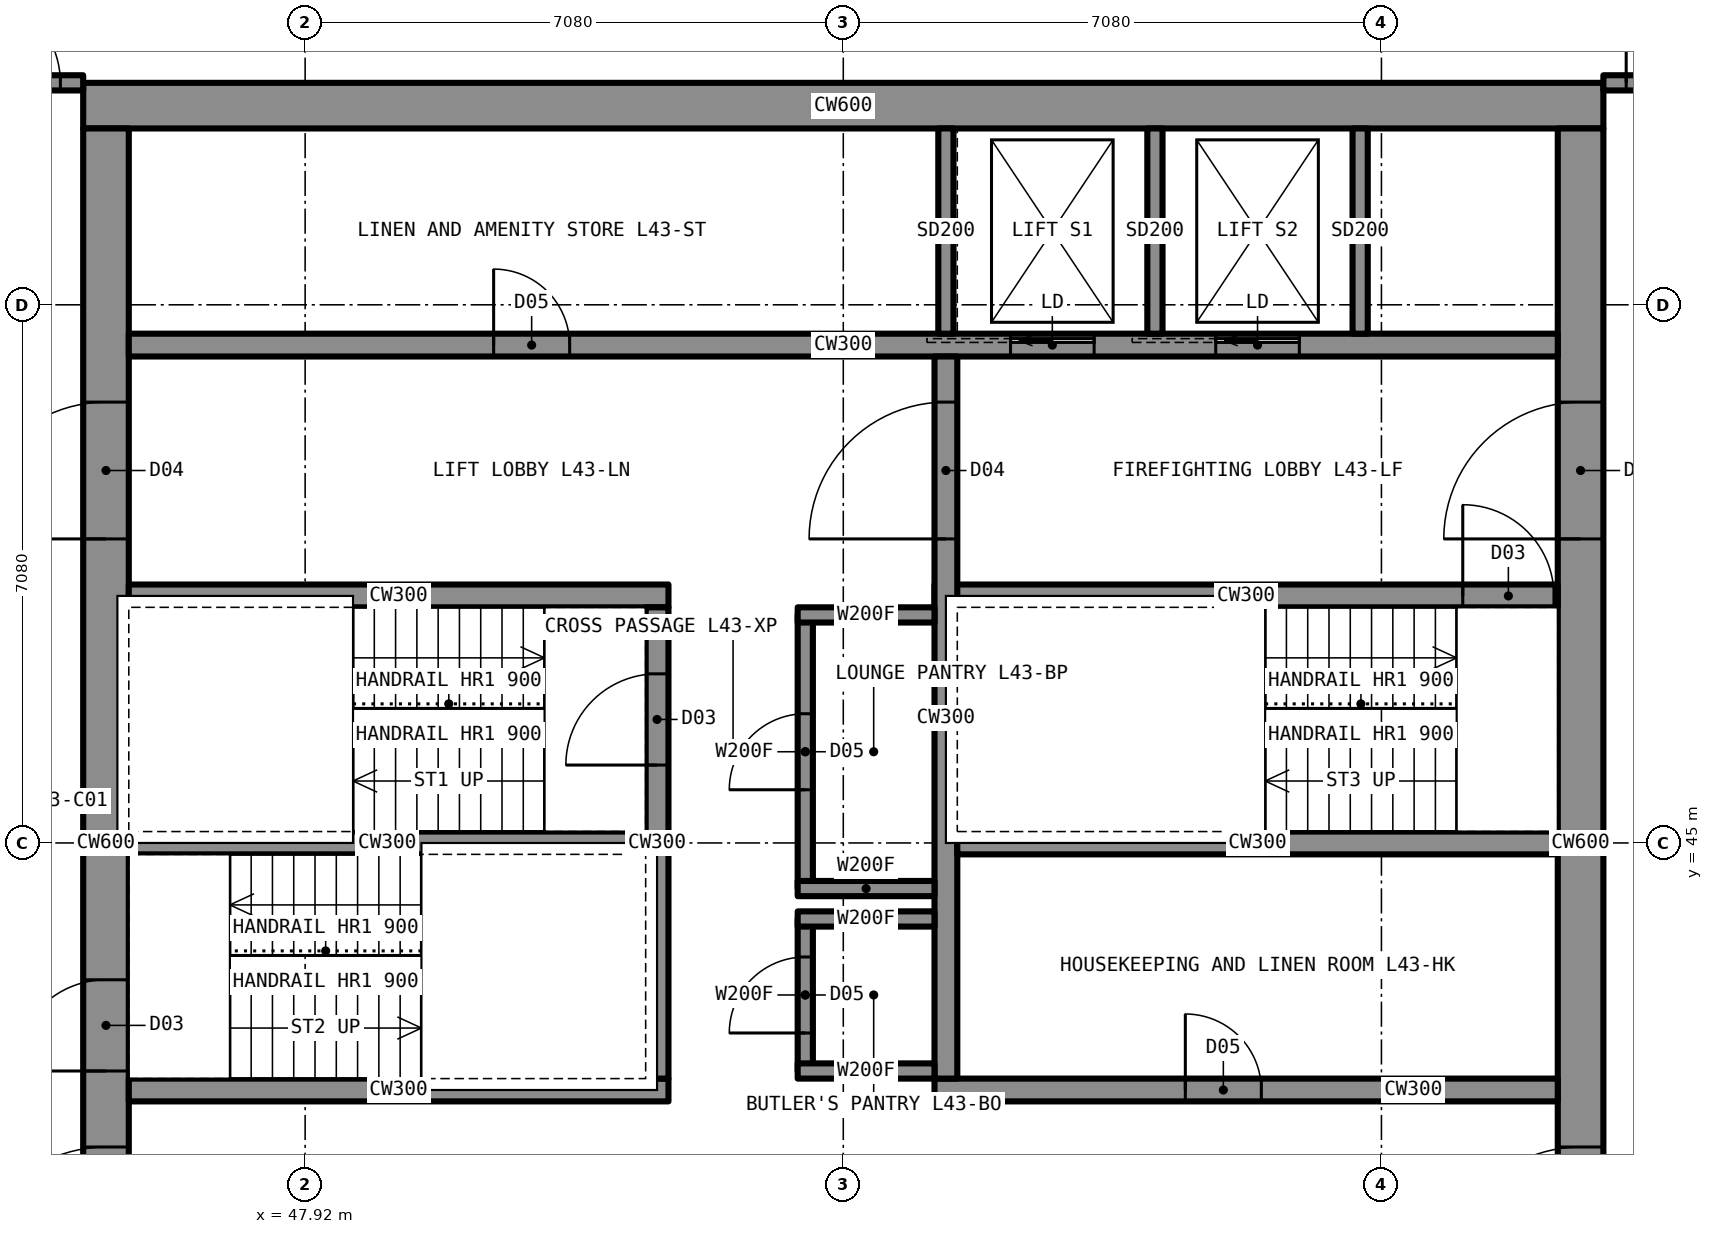
"""IFC4 building model, lengths in metres.
Left out: names, types, materials, properties, quantities, classifications, styles, units other than length and angle.
Written with IfcOpenShell. Run it as: python <this file> out.ifc"""

import sys

from ifc_helpers import new_model, si_unit, direction, frame, frame_2d, origin, place, context, subcontext, project, spatial, rectangle, extrude, element, fill, save


model = new_model("IFC4")
c1 = context("Model", 3, precision=1e-05, world=origin(), true_north=direction((0.0, 1.0)))
c2 = subcontext(c1, "Body", "Model", "MODEL_VIEW")
j1 = project(units=[si_unit("LENGTHUNIT", "METRE"), si_unit("PLANEANGLEUNIT", "RADIAN")], contexts=[c1])
p1 = place(None, origin())
s1 = spatial("IfcSite", under=j1, at=p1, CompositionType="ELEMENT")
p2 = place(p1, origin())
s2 = spatial("IfcBuilding", under=s1, at=p2, CompositionType="ELEMENT")
p3 = place(p2, frame((0.0, 0.0, 161.8)))
s3 = spatial("IfcBuildingStorey", under=s2, at=p3, CompositionType="ELEMENT", Elevation=161.8)
p4 = place(p3, frame((45.0, 54.7, 0.0), z_axis=(0.0, 0.0, 1.0), x_axis=(1.0, 0.0, 0.0)))
e1 = element("IfcWall", 1, at=p4, inside=s3, PredefinedType="SHEAR", context=c2, shape_type="SweptSolid", body=[
    extrude(rectangle(XDim=20.0, YDim=0.6, at=frame_2d((10.0, 0.0))), origin(), (0.0, 0.0, 1.0), 3.5),
])
p5 = place(p3, frame((64.7, 35.6, 0.0), z_axis=(0.0, 0.0, 1.0), x_axis=(0.0, 1.0, 0.0)))
e2 = element("IfcWall", 2, at=p5, inside=s3, PredefinedType="SHEAR", context=c2, shape_type="SweptSolid", body=[
    extrude(rectangle(XDim=18.8, YDim=0.6, at=frame_2d((9.4, 0.0))), origin(), (0.0, 0.0, 1.0), 3.5),
])
p6 = place(p5, frame((13.4, 0.0, 0.0)))
e3 = element("IfcOpeningElement", 3, at=p6, cuts=e2, PredefinedType="OPENING", context=c2, shape_type="SweptSolid", body=[
    extrude(rectangle(XDim=1.8, YDim=2.2, at=frame_2d((0.9, 1.1))), frame((0.0, 0.31, 0.0), z_axis=(0.0, -1.0, 0.0), x_axis=(1.0, 0.0, 0.0)), (0.0, 0.0, 1.0), 0.62),
])
p7 = place(p5, frame((3.6, 0.0, 0.0)))
e4 = element("IfcOpeningElement", 4, at=p7, cuts=e2, PredefinedType="OPENING", context=c2, shape_type="SweptSolid", body=[
    extrude(rectangle(XDim=1.8, YDim=2.2, at=frame_2d((0.9, 1.1))), frame((0.0, 0.31, 0.0), z_axis=(0.0, -1.0, 0.0), x_axis=(1.0, 0.0, 0.0)), (0.0, 0.0, 1.0), 0.62),
])
p8 = place(p3, frame((45.3, 35.6, 0.0), z_axis=(0.0, 0.0, 1.0), x_axis=(0.0, 1.0, 0.0)))
e5 = element("IfcWall", 5, at=p8, inside=s3, PredefinedType="SHEAR", context=c2, shape_type="SweptSolid", body=[
    extrude(rectangle(XDim=18.8, YDim=0.6, at=frame_2d((9.4, 0.0))), origin(), (0.0, 0.0, 1.0), 3.5),
])
p9 = place(p8, frame((13.4, 0.0, 0.0)))
e6 = element("IfcOpeningElement", 6, at=p9, cuts=e5, PredefinedType="OPENING", context=c2, shape_type="SweptSolid", body=[
    extrude(rectangle(XDim=1.8, YDim=2.2, at=frame_2d((0.9, 1.1))), frame((0.0, 0.31, 0.0), z_axis=(0.0, -1.0, 0.0), x_axis=(1.0, 0.0, 0.0)), (0.0, 0.0, 1.0), 0.62),
])
p10 = place(p8, frame((3.6, 0.0, 0.0)))
e7 = element("IfcOpeningElement", 7, at=p10, cuts=e5, PredefinedType="OPENING", context=c2, shape_type="SweptSolid", body=[
    extrude(rectangle(XDim=1.8, YDim=2.2, at=frame_2d((0.9, 1.1))), frame((0.0, 0.31, 0.0), z_axis=(0.0, -1.0, 0.0), x_axis=(1.0, 0.0, 0.0)), (0.0, 0.0, 1.0), 0.62),
])
p11 = place(p8, frame((6.4, 0.0, 0.0)))
e8 = element("IfcOpeningElement", 8, at=p11, cuts=e5, PredefinedType="OPENING", context=c2, shape_type="SweptSolid", body=[
    extrude(rectangle(XDim=1.2, YDim=2.2, at=frame_2d((0.6, 1.1))), frame((0.0, 0.31, 0.0), z_axis=(0.0, -1.0, 0.0), x_axis=(1.0, 0.0, 0.0)), (0.0, 0.0, 1.0), 0.62),
])
p12 = place(p3, frame((45.6, 51.55, 0.0), z_axis=(0.0, 0.0, 1.0), x_axis=(1.0, 0.0, 0.0)))
e9 = element("IfcWall", 9, at=p12, inside=s3, PredefinedType="SHEAR", context=c2, shape_type="SweptSolid", body=[
    extrude(rectangle(XDim=18.8, YDim=0.3, at=frame_2d((9.4, 0.0))), origin(), (0.0, 0.0, 1.0), 3.5),
])
p13 = place(p12, frame((4.8, 0.0, 0.0)))
e10 = element("IfcOpeningElement", 10, at=p13, cuts=e9, PredefinedType="OPENING", context=c2, shape_type="SweptSolid", body=[
    extrude(rectangle(XDim=1.0, YDim=2.1, at=frame_2d((0.5, 1.05))), frame((0.0, 0.16, 0.0), z_axis=(0.0, -1.0, 0.0), x_axis=(1.0, 0.0, 0.0)), (0.0, 0.0, 1.0), 0.32),
])
p14 = place(p12, frame((11.6, 0.0, 0.0)))
e11 = element("IfcOpeningElement", 11, at=p14, cuts=e9, PredefinedType="OPENING", context=c2, shape_type="SweptSolid", body=[
    extrude(rectangle(XDim=1.1, YDim=2.2, at=frame_2d((0.55, 1.1))), frame((0.0, 0.16, 0.0), z_axis=(0.0, -1.0, 0.0), x_axis=(1.0, 0.0, 0.0)), (0.0, 0.0, 1.0), 0.32),
])
p15 = place(p12, frame((14.3, 0.0, 0.0)))
e12 = element("IfcOpeningElement", 12, at=p15, cuts=e9, PredefinedType="OPENING", context=c2, shape_type="SweptSolid", body=[
    extrude(rectangle(XDim=1.1, YDim=2.2, at=frame_2d((0.55, 1.1))), frame((0.0, 0.16, 0.0), z_axis=(0.0, -1.0, 0.0), x_axis=(1.0, 0.0, 0.0)), (0.0, 0.0, 1.0), 0.32),
])
p16 = place(p3, frame((45.6, 48.25, 0.0), z_axis=(0.0, 0.0, 1.0), x_axis=(1.0, 0.0, 0.0)))
e13 = element("IfcWall", 13, at=p16, inside=s3, PredefinedType="SHEAR", context=c2, shape_type="SweptSolid", body=[
    extrude(rectangle(XDim=7.1, YDim=0.3, at=frame_2d((3.55, 0.0))), origin(), (0.0, 0.0, 1.0), 3.5),
])
p17 = place(p3, frame((56.2, 48.25, 0.0), z_axis=(0.0, 0.0, 1.0), x_axis=(1.0, 0.0, 0.0)))
e14 = element("IfcWall", 14, at=p17, inside=s3, PredefinedType="SHEAR", context=c2, shape_type="SweptSolid", body=[
    extrude(rectangle(XDim=8.2, YDim=0.3, at=frame_2d((4.1, 0.0))), origin(), (0.0, 0.0, 1.0), 3.5),
])
p18 = place(p17, frame((6.95, 0.0, 0.0)))
e15 = element("IfcOpeningElement", 15, at=p18, cuts=e14, PredefinedType="OPENING", context=c2, shape_type="SweptSolid", body=[
    extrude(rectangle(XDim=1.2, YDim=2.2, at=frame_2d((0.6, 1.1))), frame((0.0, 0.16, 0.0), z_axis=(0.0, -1.0, 0.0), x_axis=(1.0, 0.0, 0.0)), (0.0, 0.0, 1.0), 0.32),
])
p19 = place(p3, frame((45.6, 41.75, 0.0), z_axis=(0.0, 0.0, 1.0), x_axis=(1.0, 0.0, 0.0)))
e16 = element("IfcWall", 16, at=p19, inside=s3, PredefinedType="SHEAR", context=c2, shape_type="SweptSolid", body=[
    extrude(rectangle(XDim=7.1, YDim=0.3, at=frame_2d((3.55, 0.0))), origin(), (0.0, 0.0, 1.0), 3.5),
])
p20 = place(p3, frame((56.2, 41.75, 0.0), z_axis=(0.0, 0.0, 1.0), x_axis=(1.0, 0.0, 0.0)))
e17 = element("IfcWall", 17, at=p20, inside=s3, PredefinedType="SHEAR", context=c2, shape_type="SweptSolid", body=[
    extrude(rectangle(XDim=8.2, YDim=0.3, at=frame_2d((4.1, 0.0))), origin(), (0.0, 0.0, 1.0), 3.5),
])
p21 = place(p20, frame((3.3, 0.0, 0.0)))
e18 = element("IfcOpeningElement", 18, at=p21, cuts=e17, PredefinedType="OPENING", context=c2, shape_type="SweptSolid", body=[
    extrude(rectangle(XDim=1.0, YDim=2.1, at=frame_2d((0.5, 1.05))), frame((0.0, 0.16, 0.0), z_axis=(0.0, -1.0, 0.0), x_axis=(1.0, 0.0, 0.0)), (0.0, 0.0, 1.0), 0.32),
])
p22 = place(p3, frame((52.55, 41.9, 0.0), z_axis=(0.0, 0.0, 1.0), x_axis=(0.0, 1.0, 0.0)))
e19 = element("IfcWall", 19, at=p22, inside=s3, PredefinedType="SHEAR", context=c2, shape_type="SweptSolid", body=[
    extrude(rectangle(XDim=6.2, YDim=0.3, at=frame_2d((3.1, 0.0))), origin(), (0.0, 0.0, 1.0), 3.5),
])
p23 = place(p22, frame((4.125, 0.0, 0.0)))
e20 = element("IfcOpeningElement", 20, at=p23, cuts=e19, PredefinedType="OPENING", context=c2, shape_type="SweptSolid", body=[
    extrude(rectangle(XDim=1.2, YDim=2.2, at=frame_2d((0.6, 1.1))), frame((0.0, 0.16, 0.0), z_axis=(0.0, -1.0, 0.0), x_axis=(1.0, 0.0, 0.0)), (0.0, 0.0, 1.0), 0.32),
])
p24 = place(p3, frame((56.35, 41.9, 0.0), z_axis=(0.0, 0.0, 1.0), x_axis=(0.0, 1.0, 0.0)))
e21 = element("IfcWall", 21, at=p24, inside=s3, PredefinedType="SHEAR", context=c2, shape_type="SweptSolid", body=[
    extrude(rectangle(XDim=9.5, YDim=0.3, at=frame_2d((4.75, 0.0))), origin(), (0.0, 0.0, 1.0), 3.5),
])
p25 = place(p24, frame((7.1, 0.0, 0.0)))
e22 = element("IfcOpeningElement", 22, at=p25, cuts=e21, PredefinedType="OPENING", context=c2, shape_type="SweptSolid", body=[
    extrude(rectangle(XDim=1.8, YDim=2.2, at=frame_2d((0.9, 1.1))), frame((0.0, 0.16, 0.0), z_axis=(0.0, -1.0, 0.0), x_axis=(1.0, 0.0, 0.0)), (0.0, 0.0, 1.0), 0.32),
])
p26 = place(p3, frame((45.6, 45.0, 0.0), z_axis=(0.0, 0.0, 1.0), x_axis=(1.0, 0.0, 0.0)))
e23 = element("IfcWall", 23, at=p26, inside=s3, PredefinedType="SHEAR", context=c2, shape_type="SweptSolid", body=[
    extrude(rectangle(XDim=6.8, YDim=0.3, at=frame_2d((3.4, 0.0))), origin(), (0.0, 0.0, 1.0), 3.5),
])
p27 = place(p3, frame((56.5, 45.0, 0.0), z_axis=(0.0, 0.0, 1.0), x_axis=(1.0, 0.0, 0.0)))
e24 = element("IfcWall", 24, at=p27, inside=s3, PredefinedType="SHEAR", context=c2, shape_type="SweptSolid", body=[
    extrude(rectangle(XDim=7.9, YDim=0.3, at=frame_2d((3.95, 0.0))), origin(), (0.0, 0.0, 1.0), 3.5),
])
p28 = place(p3, frame((43.2, 55.0, 0.0), z_axis=(0.0, 0.0, 1.0), x_axis=(1.0, 0.0, 0.0)))
e25 = element("IfcWall", 25, at=p28, inside=s3, PredefinedType="PARTITIONING", context=c2, shape_type="SweptSolid", body=[
    extrude(rectangle(XDim=1.8, YDim=0.2, at=frame_2d((0.9, 0.0))), origin(), (0.0, 0.0, 1.0), 3.33),
])
p29 = place(p28, frame((0.3, 0.0, 0.0)))
e26 = element("IfcOpeningElement", 26, at=p29, cuts=e25, PredefinedType="OPENING", context=c2, shape_type="SweptSolid", body=[
    extrude(rectangle(XDim=1.2, YDim=2.2, at=frame_2d((0.6, 1.1))), frame((0.0, 0.11, 0.0), z_axis=(0.0, -1.0, 0.0), x_axis=(1.0, 0.0, 0.0)), (0.0, 0.0, 1.0), 0.22),
])
p30 = place(p3, frame((65.0, 55.0, 0.0), z_axis=(0.0, 0.0, 1.0), x_axis=(1.0, 0.0, 0.0)))
e27 = element("IfcWall", 27, at=p30, inside=s3, PredefinedType="PARTITIONING", context=c2, shape_type="SweptSolid", body=[
    extrude(rectangle(XDim=1.8, YDim=0.2, at=frame_2d((0.9, 0.0))), origin(), (0.0, 0.0, 1.0), 3.33),
])
p31 = place(p30, frame((0.3, 0.0, 0.0)))
e28 = element("IfcOpeningElement", 28, at=p31, cuts=e27, PredefinedType="OPENING", context=c2, shape_type="SweptSolid", body=[
    extrude(rectangle(XDim=1.2, YDim=2.2, at=frame_2d((0.6, 1.1))), frame((0.0, 0.11, 0.0), z_axis=(0.0, -1.0, 0.0), x_axis=(1.0, 0.0, 0.0)), (0.0, 0.0, 1.0), 0.22),
])
p32 = place(p3, frame((54.5, 42.0, 0.0), z_axis=(0.0, 0.0, 1.0), x_axis=(0.0, 1.0, 0.0)))
e29 = element("IfcWall", 29, at=p32, inside=s3, PredefinedType="PARTITIONING", context=c2, shape_type="SweptSolid", body=[
    extrude(rectangle(XDim=2.0, YDim=0.2, at=frame_2d((1.0, 0.0))), origin(), (0.0, 0.0, 1.0), 3.33),
])
p33 = place(p32, frame((0.5, 0.0, 0.0)))
e30 = element("IfcOpeningElement", 30, at=p33, cuts=e29, PredefinedType="OPENING", context=c2, shape_type="SweptSolid", body=[
    extrude(rectangle(XDim=1.0, YDim=2.1, at=frame_2d((0.5, 1.05))), frame((0.0, 0.11, 0.0), z_axis=(0.0, -1.0, 0.0), x_axis=(1.0, 0.0, 0.0)), (0.0, 0.0, 1.0), 0.22),
])
for number, where, z_axis, x_axis in (
    (31, (54.4, 42.0, 0.0), (0.0, 0.0, 1.0), (1.0, 0.0, 0.0)),
    (32, (54.4, 44.0, 0.0), (0.0, 0.0, 1.0), (1.0, 0.0, 0.0)),
):
    element("IfcWall", number, at=place(p3, frame(where, z_axis=z_axis, x_axis=x_axis)), inside=s3, PredefinedType="PARTITIONING", context=c2, shape_type="SweptSolid", body=[
        extrude(rectangle(XDim=1.8, YDim=0.2, at=frame_2d((0.9, 0.0))), origin(), (0.0, 0.0, 1.0), 3.33),
    ])
p34 = place(p3, frame((54.5, 44.4, 0.0), z_axis=(0.0, 0.0, 1.0), x_axis=(0.0, 1.0, 0.0)))
e33 = element("IfcWall", 33, at=p34, inside=s3, PredefinedType="PARTITIONING", context=c2, shape_type="SweptSolid", body=[
    extrude(rectangle(XDim=3.6, YDim=0.2, at=frame_2d((1.8, 0.0))), origin(), (0.0, 0.0, 1.0), 3.33),
])
p35 = place(p34, frame((1.3, 0.0, 0.0)))
e34 = element("IfcOpeningElement", 34, at=p35, cuts=e33, PredefinedType="OPENING", context=c2, shape_type="SweptSolid", body=[
    extrude(rectangle(XDim=1.0, YDim=2.1, at=frame_2d((0.5, 1.05))), frame((0.0, 0.11, 0.0), z_axis=(0.0, -1.0, 0.0), x_axis=(1.0, 0.0, 0.0)), (0.0, 0.0, 1.0), 0.22),
])
for number, where, z_axis, x_axis in (
    (35, (54.4, 44.4, 0.0), (0.0, 0.0, 1.0), (1.0, 0.0, 0.0)),
    (36, (54.4, 48.0, 0.0), (0.0, 0.0, 1.0), (1.0, 0.0, 0.0)),
):
    element("IfcWall", number, at=place(p3, frame(where, z_axis=z_axis, x_axis=x_axis)), inside=s3, PredefinedType="PARTITIONING", context=c2, shape_type="SweptSolid", body=[
        extrude(rectangle(XDim=1.8, YDim=0.2, at=frame_2d((0.9, 0.0))), origin(), (0.0, 0.0, 1.0), 3.33),
    ])
for number, where, z_axis, x_axis in (
    (37, (59.1, 51.7, 0.0), (0.0, 0.0, 1.0), (0.0, 1.0, 0.0)),
    (38, (61.8, 51.7, 0.0), (0.0, 0.0, 1.0), (0.0, 1.0, 0.0)),
    (39, (56.35, 51.7, 0.0), (0.0, 0.0, 1.0), (0.0, 1.0, 0.0)),
):
    element("IfcWall", number, at=place(p3, frame(where, z_axis=z_axis, x_axis=x_axis)), inside=s3, PredefinedType="PARTITIONING", context=c2, shape_type="SweptSolid", body=[
        extrude(rectangle(XDim=2.7, YDim=0.2, at=frame_2d((1.35, 0.0))), origin(), (0.0, 0.0, 1.0), 3.33),
    ])
p36 = place(p29, origin())
e40 = element("IfcDoor", 40, at=p36, inside=s3, OperationType="SINGLE_SWING_LEFT", PredefinedType="DOOR", context=c2, shape_type="SweptSolid", body=[
    extrude(rectangle(XDim=1.2, YDim=2.2, at=frame_2d((0.6, 1.1))), frame((0.0, 0.025, 0.0), z_axis=(0.0, -1.0, 0.0), x_axis=(1.0, 0.0, 0.0)), (0.0, 0.0, 1.0), 0.05),
])
fill(e26, e40)
p37 = place(p31, origin())
e41 = element("IfcDoor", 41, at=p37, inside=s3, OperationType="SINGLE_SWING_LEFT", PredefinedType="DOOR", context=c2, shape_type="SweptSolid", body=[
    extrude(rectangle(XDim=1.2, YDim=2.2, at=frame_2d((0.6, 1.1))), frame((0.0, 0.025, 0.0), z_axis=(0.0, -1.0, 0.0), x_axis=(1.0, 0.0, 0.0)), (0.0, 0.0, 1.0), 0.05),
])
fill(e28, e41)
p38 = place(p33, origin())
e42 = element("IfcDoor", 42, at=p38, inside=s3, OperationType="SINGLE_SWING_LEFT", PredefinedType="DOOR", context=c2, shape_type="SweptSolid", body=[
    extrude(rectangle(XDim=1.0, YDim=2.1, at=frame_2d((0.5, 1.05))), frame((0.0, 0.025, 0.0), z_axis=(0.0, -1.0, 0.0), x_axis=(1.0, 0.0, 0.0)), (0.0, 0.0, 1.0), 0.05),
])
fill(e30, e42)
p39 = place(p35, origin())
e43 = element("IfcDoor", 43, at=p39, inside=s3, OperationType="SINGLE_SWING_LEFT", PredefinedType="DOOR", context=c2, shape_type="SweptSolid", body=[
    extrude(rectangle(XDim=1.0, YDim=2.1, at=frame_2d((0.5, 1.05))), frame((0.0, 0.025, 0.0), z_axis=(0.0, -1.0, 0.0), x_axis=(1.0, 0.0, 0.0)), (0.0, 0.0, 1.0), 0.05),
])
fill(e34, e43)
p40 = place(p9, origin())
e44 = element("IfcDoor", 44, at=p40, inside=s3, OperationType="DOUBLE_DOOR_SINGLE_SWING", PredefinedType="DOOR", context=c2, shape_type="SweptSolid", body=[
    extrude(rectangle(XDim=1.8, YDim=2.2, at=frame_2d((0.9, 1.1))), frame((0.0, 0.025, 0.0), z_axis=(0.0, -1.0, 0.0), x_axis=(1.0, 0.0, 0.0)), (0.0, 0.0, 1.0), 0.05),
])
fill(e6, e44)
p41 = place(p10, origin())
e45 = element("IfcDoor", 45, at=p41, inside=s3, OperationType="DOUBLE_DOOR_SINGLE_SWING", PredefinedType="DOOR", context=c2, shape_type="SweptSolid", body=[
    extrude(rectangle(XDim=1.8, YDim=2.2, at=frame_2d((0.9, 1.1))), frame((0.0, 0.025, 0.0), z_axis=(0.0, -1.0, 0.0), x_axis=(1.0, 0.0, 0.0)), (0.0, 0.0, 1.0), 0.05),
])
fill(e7, e45)
p42 = place(p6, origin())
e46 = element("IfcDoor", 46, at=p42, inside=s3, OperationType="DOUBLE_DOOR_SINGLE_SWING", PredefinedType="DOOR", context=c2, shape_type="SweptSolid", body=[
    extrude(rectangle(XDim=1.8, YDim=2.2, at=frame_2d((0.9, 1.1))), frame((0.0, 0.025, 0.0), z_axis=(0.0, -1.0, 0.0), x_axis=(1.0, 0.0, 0.0)), (0.0, 0.0, 1.0), 0.05),
])
fill(e3, e46)
p43 = place(p7, origin())
e47 = element("IfcDoor", 47, at=p43, inside=s3, OperationType="DOUBLE_DOOR_SINGLE_SWING", PredefinedType="DOOR", context=c2, shape_type="SweptSolid", body=[
    extrude(rectangle(XDim=1.8, YDim=2.2, at=frame_2d((0.9, 1.1))), frame((0.0, 0.025, 0.0), z_axis=(0.0, -1.0, 0.0), x_axis=(1.0, 0.0, 0.0)), (0.0, 0.0, 1.0), 0.05),
])
fill(e4, e47)
p44 = place(p25, origin())
e48 = element("IfcDoor", 48, at=p44, inside=s3, OperationType="DOUBLE_DOOR_SINGLE_SWING", PredefinedType="DOOR", context=c2, shape_type="SweptSolid", body=[
    extrude(rectangle(XDim=1.8, YDim=2.2, at=frame_2d((0.9, 1.1))), frame((0.0, 0.025, 0.0), z_axis=(0.0, -1.0, 0.0), x_axis=(1.0, 0.0, 0.0)), (0.0, 0.0, 1.0), 0.05),
])
fill(e22, e48)
p45 = place(p23, origin())
e49 = element("IfcDoor", 49, at=p45, inside=s3, OperationType="SINGLE_SWING_LEFT", PredefinedType="DOOR", context=c2, shape_type="SweptSolid", body=[
    extrude(rectangle(XDim=1.2, YDim=2.2, at=frame_2d((0.6, 1.1))), frame((0.0, 0.025, 0.0), z_axis=(0.0, -1.0, 0.0), x_axis=(1.0, 0.0, 0.0)), (0.0, 0.0, 1.0), 0.05),
])
fill(e20, e49)
p46 = place(p11, origin())
e50 = element("IfcDoor", 50, at=p46, inside=s3, OperationType="SINGLE_SWING_LEFT", PredefinedType="DOOR", context=c2, shape_type="SweptSolid", body=[
    extrude(rectangle(XDim=1.2, YDim=2.2, at=frame_2d((0.6, 1.1))), frame((0.0, 0.025, 0.0), z_axis=(0.0, -1.0, 0.0), x_axis=(1.0, 0.0, 0.0)), (0.0, 0.0, 1.0), 0.05),
])
fill(e8, e50)
p47 = place(p18, origin())
e51 = element("IfcDoor", 51, at=p47, inside=s3, OperationType="SINGLE_SWING_LEFT", PredefinedType="DOOR", context=c2, shape_type="SweptSolid", body=[
    extrude(rectangle(XDim=1.2, YDim=2.2, at=frame_2d((0.6, 1.1))), frame((0.0, 0.025, 0.0), z_axis=(0.0, -1.0, 0.0), x_axis=(1.0, 0.0, 0.0)), (0.0, 0.0, 1.0), 0.05),
])
fill(e15, e51)
p48 = place(p21, origin())
e52 = element("IfcDoor", 52, at=p48, inside=s3, OperationType="SINGLE_SWING_LEFT", PredefinedType="DOOR", context=c2, shape_type="SweptSolid", body=[
    extrude(rectangle(XDim=1.0, YDim=2.1, at=frame_2d((0.5, 1.05))), frame((0.0, 0.025, 0.0), z_axis=(0.0, -1.0, 0.0), x_axis=(1.0, 0.0, 0.0)), (0.0, 0.0, 1.0), 0.05),
])
fill(e18, e52)
p49 = place(p13, origin())
e53 = element("IfcDoor", 53, at=p49, inside=s3, OperationType="SINGLE_SWING_LEFT", PredefinedType="DOOR", context=c2, shape_type="SweptSolid", body=[
    extrude(rectangle(XDim=1.0, YDim=2.1, at=frame_2d((0.5, 1.05))), frame((0.0, 0.025, 0.0), z_axis=(0.0, -1.0, 0.0), x_axis=(1.0, 0.0, 0.0)), (0.0, 0.0, 1.0), 0.05),
])
fill(e10, e53)
p50 = place(p14, origin())
e54 = element("IfcDoor", 54, at=p50, inside=s3, OperationType="SLIDING_TO_LEFT", PredefinedType="DOOR", context=c2, shape_type="SweptSolid", body=[
    extrude(rectangle(XDim=1.1, YDim=2.2, at=frame_2d((0.55, 1.1))), frame((0.0, 0.025, 0.0), z_axis=(0.0, -1.0, 0.0), x_axis=(1.0, 0.0, 0.0)), (0.0, 0.0, 1.0), 0.05),
])
fill(e11, e54)
p51 = place(p15, origin())
e55 = element("IfcDoor", 55, at=p51, inside=s3, OperationType="SLIDING_TO_LEFT", PredefinedType="DOOR", context=c2, shape_type="SweptSolid", body=[
    extrude(rectangle(XDim=1.1, YDim=2.2, at=frame_2d((0.55, 1.1))), frame((0.0, 0.025, 0.0), z_axis=(0.0, -1.0, 0.0), x_axis=(1.0, 0.0, 0.0)), (0.0, 0.0, 1.0), 0.05),
])
fill(e12, e55)
save(model, sys.argv[1])
